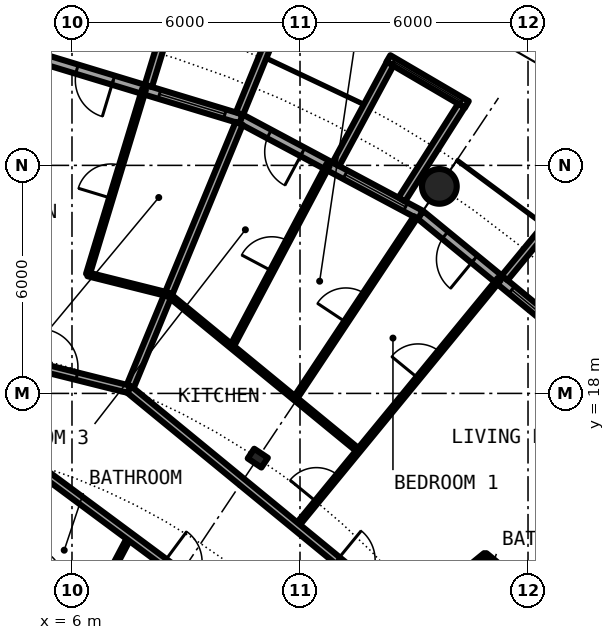
"""IFC4 building model, lengths in metres.
Left out: names, types, materials, properties, quantities, classifications, styles, units other than length and angle.
Written with IfcOpenShell. Run it as: python <this file> out.ifc"""

import sys

from ifc_helpers import new_model, si_unit, direction, frame, frame_2d, origin, origin_2d, place, context, subcontext, project, spatial, rectangle, circle, hollow_circle, i_section, extrude, element, fill, save


model = new_model("IFC4")
c1 = context("Model", 3, precision=1e-05, world=origin(), true_north=direction((0.0, 1.0)))
c2 = subcontext(c1, "Body", "Model", "MODEL_VIEW")
j1 = project(units=[si_unit("LENGTHUNIT", "METRE"), si_unit("PLANEANGLEUNIT", "RADIAN")], contexts=[c1])
p1 = place(None, origin())
s1 = spatial("IfcSite", under=j1, at=p1, CompositionType="ELEMENT")
p2 = place(p1, origin())
s2 = spatial("IfcBuilding", under=s1, at=p2, CompositionType="ELEMENT")
p3 = place(p2, frame((0.0, 0.0, 111.65)))
s3 = spatial("IfcBuildingStorey", under=s2, at=p3, CompositionType="ELEMENT", Elevation=111.65)
p4 = place(p3, frame((15.667, 23.448, 0.0), z_axis=(0.0, 0.0, 1.0), x_axis=(1.0, 0.0, 0.0)))
e1 = element("IfcColumn", 1, at=p4, inside=s3, PredefinedType="COLUMN", context=c2, shape_type="SweptSolid", body=[
    extrude(hollow_circle(Radius=0.457, WallThickness=0.04, at=origin_2d()), origin(), (0.0, 0.0, 1.0), 3.05),
])
p5 = place(p3, frame((10.889, 16.297, 0.0), z_axis=(0.0, 0.0, 1.0), x_axis=(0.55557023302, 0.831469612303, 0.0)))
e2 = element("IfcColumn", 2, at=p5, inside=s3, PredefinedType="COLUMN", context=c2, shape_type="SweptSolid", body=[
    extrude(i_section(OverallWidth=0.307, OverallDepth=0.432, WebThickness=0.021, FlangeThickness=0.04, FilletRadius=0.027, at=origin_2d()), origin(), (0.0, 0.0, 1.0), 3.05),
])
p6 = place(p3, frame((19.304, 19.304, 0.0), z_axis=(0.0, 0.0, 1.0), x_axis=(-0.773019449054, 0.634382322723, 0.0)))
e3 = element("IfcWall", 3, at=p6, inside=s3, PredefinedType="SOLIDWALL", context=c2, shape_type="SweptSolid", body=[
    extrude(rectangle(XDim=5.352, YDim=0.25, at=frame_2d((2.676, 0.0))), origin(), (0.0, 0.0, 1.0), 2.7),
])
p7 = place(p6, frame((0.441, 0.0, 0.3)))
e4 = element("IfcOpeningElement", 4, at=p7, cuts=e3, PredefinedType="OPENING", context=c2, shape_type="SweptSolid", body=[
    extrude(rectangle(XDim=1.8, YDim=2.1, at=frame_2d((0.9, 1.05))), frame((0.0, 0.135, 0.0), z_axis=(0.0, -1.0, 0.0), x_axis=(1.0, 0.0, 0.0)), (0.0, 0.0, 1.0), 0.27),
])
p8 = place(p6, frame((3.51, 0.0, 0.0)))
e5 = element("IfcOpeningElement", 5, at=p8, cuts=e3, PredefinedType="OPENING", context=c2, shape_type="SweptSolid", body=[
    extrude(rectangle(XDim=1.0, YDim=2.2, at=frame_2d((0.5, 1.1))), frame((0.0, 0.135, 0.0), z_axis=(0.0, -1.0, 0.0), x_axis=(1.0, 0.0, 0.0)), (0.0, 0.0, 1.0), 0.27),
])
p9 = place(p3, frame((17.384, 21.041, -0.03), z_axis=(0.0, 0.0, 1.0), x_axis=(0.63709551667, 0.770784861449, 0.0)))
e6 = element("IfcWall", 6, at=p9, inside=s3, PredefinedType="SOLIDWALL", context=c2, shape_type="SweptSolid", body=[
    extrude(rectangle(XDim=3.006, YDim=0.2, at=frame_2d((1.503, 0.0))), origin(), (0.0, 0.0, 1.0), 2.73),
])
p10 = place(p3, frame((15.167, 22.699, 0.0), z_axis=(0.0, 0.0, 1.0), x_axis=(-0.881915646801, 0.471407246368, 0.0)))
e7 = element("IfcWall", 7, at=p10, inside=s3, PredefinedType="SOLIDWALL", context=c2, shape_type="SweptSolid", body=[
    extrude(rectangle(XDim=5.352, YDim=0.25, at=frame_2d((2.676, 0.0))), origin(), (0.0, 0.0, 1.0), 2.7),
])
p11 = place(p10, frame((0.441, 0.0, 0.3)))
e8 = element("IfcOpeningElement", 8, at=p11, cuts=e7, PredefinedType="OPENING", context=c2, shape_type="SweptSolid", body=[
    extrude(rectangle(XDim=1.8, YDim=2.1, at=frame_2d((0.9, 1.05))), frame((0.0, 0.135, 0.0), z_axis=(0.0, -1.0, 0.0), x_axis=(1.0, 0.0, 0.0)), (0.0, 0.0, 1.0), 0.27),
])
p12 = place(p10, frame((3.51, 0.0, 0.0)))
e9 = element("IfcOpeningElement", 9, at=p12, cuts=e7, PredefinedType="OPENING", context=c2, shape_type="SweptSolid", body=[
    extrude(rectangle(XDim=1.0, YDim=2.2, at=frame_2d((0.5, 1.1))), frame((0.0, 0.135, 0.0), z_axis=(0.0, -1.0, 0.0), x_axis=(1.0, 0.0, 0.0)), (0.0, 0.0, 1.0), 0.27),
])
p13 = place(p3, frame((16.39, 25.603, -0.03), z_axis=(0.0, 0.0, 1.0), x_axis=(-0.862762477128, 0.505609442218, 0.0)))
e10 = element("IfcWall", 10, at=p13, inside=s3, PredefinedType="SOLIDWALL", context=c2, shape_type="SweptSolid", body=[
    extrude(rectangle(XDim=2.391, YDim=0.2, at=frame_2d((1.196, 0.0))), origin(), (0.0, 0.0, 1.0), 2.73),
])
p14 = place(p13, frame((0.156, 0.0, 0.33)))
e11 = element("IfcOpeningElement", 11, at=p14, cuts=e10, PredefinedType="OPENING", context=c2, shape_type="SweptSolid", body=[
    extrude(circle(Radius=1.04, at=frame_2d((1.04, 1.04))), frame((0.0, 0.11, 0.0), z_axis=(0.0, -1.0, 0.0), x_axis=(1.0, 0.0, 0.0)), (0.0, 0.0, 1.0), 0.22),
])
p15 = place(p3, frame((14.678, 23.102, -0.03), z_axis=(0.0, 0.0, 1.0), x_axis=(0.536001536573, 0.844217005746, 0.0)))
e12 = element("IfcWall", 12, at=p15, inside=s3, PredefinedType="SOLIDWALL", context=c2, shape_type="SweptSolid", body=[
    extrude(rectangle(XDim=2.929, YDim=0.2, at=frame_2d((1.465, 0.0))), origin(), (0.0, 0.0, 1.0), 2.73),
])
p16 = place(p3, frame((12.945, 24.029, -0.03), z_axis=(0.0, 0.0, 1.0), x_axis=(0.474424310775, 0.88029629861, 0.0)))
e13 = element("IfcWall", 13, at=p16, inside=s3, PredefinedType="SOLIDWALL", context=c2, shape_type="SweptSolid", body=[
    extrude(rectangle(XDim=3.006, YDim=0.2, at=frame_2d((1.503, 0.0))), origin(), (0.0, 0.0, 1.0), 2.73),
])
p17 = place(p3, frame((10.447, 25.222, 0.0), z_axis=(0.0, 0.0, 1.0), x_axis=(-0.956965678721, 0.290201119486, 0.0)))
e14 = element("IfcWall", 14, at=p17, inside=s3, PredefinedType="SOLIDWALL", context=c2, shape_type="SweptSolid", body=[
    extrude(rectangle(XDim=5.351, YDim=0.25, at=frame_2d((2.676, 0.0))), origin(), (0.0, 0.0, 1.0), 2.7),
])
p18 = place(p17, frame((0.441, 0.0, 0.3)))
e15 = element("IfcOpeningElement", 15, at=p18, cuts=e14, PredefinedType="OPENING", context=c2, shape_type="SweptSolid", body=[
    extrude(rectangle(XDim=1.8, YDim=2.1, at=frame_2d((0.9, 1.05))), frame((0.0, 0.135, 0.0), z_axis=(0.0, -1.0, 0.0), x_axis=(1.0, 0.0, 0.0)), (0.0, 0.0, 1.0), 0.27),
])
p19 = place(p17, frame((3.51, 0.0, 0.0)))
e16 = element("IfcOpeningElement", 16, at=p19, cuts=e14, PredefinedType="OPENING", context=c2, shape_type="SweptSolid", body=[
    extrude(rectangle(XDim=1.0, YDim=2.2, at=frame_2d((0.5, 1.1))), frame((0.0, 0.135, 0.0), z_axis=(0.0, -1.0, 0.0), x_axis=(1.0, 0.0, 0.0)), (0.0, 0.0, 1.0), 0.27),
])
p20 = place(p3, frame((10.409, 25.364, -0.03), z_axis=(0.0, 0.0, 1.0), x_axis=(0.379509886562, 0.925187681501, 0.0)))
e17 = element("IfcWall", 17, at=p20, inside=s3, PredefinedType="SOLIDWALL", context=c2, shape_type="SweptSolid", body=[
    extrude(rectangle(XDim=2.883, YDim=0.2, at=frame_2d((1.441, 0.0))), origin(), (0.0, 0.0, 1.0), 2.73),
])
p21 = place(p3, frame((8.009, 26.092, -0.03), z_axis=(0.0, 0.0, 1.0), x_axis=(0.293406695073, 0.955987715029, 0.0)))
e18 = element("IfcWall", 18, at=p21, inside=s3, PredefinedType="SOLIDWALL", context=c2, shape_type="SweptSolid", body=[
    extrude(rectangle(XDim=3.006, YDim=0.2, at=frame_2d((1.503, 0.0))), origin(), (0.0, 0.0, 1.0), 2.73),
])
p22 = place(p3, frame((6.318, 11.96, 0.0), z_axis=(0.0, 0.0, 1.0), x_axis=(0.467001992543, 0.884256263173, 0.0)))
e19 = element("IfcWall", 19, at=p22, inside=s3, PredefinedType="PARTITIONING", context=c2, shape_type="SweptSolid", body=[
    extrude(rectangle(XDim=2.572, YDim=0.1, at=frame_2d((1.286, 0.0))), origin(), (0.0, 0.0, 1.0), 2.7),
])
p23 = place(p3, frame((6.418, 21.133, 0.0), z_axis=(0.0, 0.0, 1.0), x_axis=(0.290651827018, 0.956828885147, 0.0)))
e20 = element("IfcWall", 20, at=p23, inside=s3, PredefinedType="PARTITIONING", context=c2, shape_type="SweptSolid", body=[
    extrude(rectangle(XDim=5.089, YDim=0.1, at=frame_2d((2.544, 0.0))), origin(), (0.0, 0.0, 1.0), 2.7),
])
p24 = place(p23, frame((2.094, 0.0, 0.0)))
e21 = element("IfcOpeningElement", 21, at=p24, cuts=e20, PredefinedType="OPENING", context=c2, shape_type="SweptSolid", body=[
    extrude(rectangle(XDim=0.9, YDim=2.3, at=frame_2d((0.45, 1.15))), frame((0.0, 0.06, 0.0), z_axis=(0.0, -1.0, 0.0), x_axis=(1.0, 0.0, 0.0)), (0.0, 0.0, 1.0), 0.12),
])
p25 = place(p3, frame((7.501, 18.108, 0.0), z_axis=(0.0, 0.0, 1.0), x_axis=(0.382490346157, 0.923959487801, 0.0)))
e22 = element("IfcWall", 22, at=p25, inside=s3, PredefinedType="PARTITIONING", context=c2, shape_type="SweptSolid", body=[
    extrude(rectangle(XDim=7.574, YDim=0.2, at=frame_2d((3.787, 0.0))), origin(), (0.0, 0.0, 1.0), 2.7),
])
p26 = place(p3, frame((10.204, 19.233, 0.0), z_axis=(0.0, 0.0, 1.0), x_axis=(0.468610030042, 0.883405139075, 0.0)))
e23 = element("IfcWall", 23, at=p26, inside=s3, PredefinedType="PARTITIONING", context=c2, shape_type="SweptSolid", body=[
    extrude(rectangle(XDim=5.403, YDim=0.1, at=frame_2d((2.702, 0.0))), origin(), (0.0, 0.0, 1.0), 2.7),
])
p27 = place(p26, frame((2.251, 0.0, 0.0)))
e24 = element("IfcOpeningElement", 24, at=p27, cuts=e23, PredefinedType="OPENING", context=c2, shape_type="SweptSolid", body=[
    extrude(rectangle(XDim=0.9, YDim=2.3, at=frame_2d((0.45, 1.15))), frame((0.0, 0.06, 0.0), z_axis=(0.0, -1.0, 0.0), x_axis=(1.0, 0.0, 0.0)), (0.0, 0.0, 1.0), 0.12),
])
p28 = place(p3, frame((11.87, 17.865, 0.0), z_axis=(0.0, 0.0, 1.0), x_axis=(0.553440102418, 0.832888980018, 0.0)))
e25 = element("IfcWall", 25, at=p28, inside=s3, PredefinedType="PARTITIONING", context=c2, shape_type="SweptSolid", body=[
    extrude(rectangle(XDim=5.726, YDim=0.1, at=frame_2d((2.863, 0.0))), origin(), (0.0, 0.0, 1.0), 2.7),
])
p29 = place(p28, frame((2.413, 0.0, 0.0)))
e26 = element("IfcOpeningElement", 26, at=p29, cuts=e25, PredefinedType="OPENING", context=c2, shape_type="SweptSolid", body=[
    extrude(rectangle(XDim=0.9, YDim=2.3, at=frame_2d((0.45, 1.15))), frame((0.0, 0.06, 0.0), z_axis=(0.0, -1.0, 0.0), x_axis=(1.0, 0.0, 0.0)), (0.0, 0.0, 1.0), 0.12),
])
p30 = place(p3, frame((11.9, 14.498, 0.0), z_axis=(0.0, 0.0, 1.0), x_axis=(0.634465454582, 0.772951218993, 0.0)))
e27 = element("IfcWall", 27, at=p30, inside=s3, PredefinedType="PARTITIONING", context=c2, shape_type="SweptSolid", body=[
    extrude(rectangle(XDim=8.42, YDim=0.1, at=frame_2d((4.21, 0.0))), origin(), (0.0, 0.0, 1.0), 2.7),
])
p31 = place(p30, frame((0.84, 0.0, 0.0)))
e28 = element("IfcOpeningElement", 28, at=p31, cuts=e27, PredefinedType="OPENING", context=c2, shape_type="SweptSolid", body=[
    extrude(rectangle(XDim=0.9, YDim=2.3, at=frame_2d((0.45, 1.15))), frame((0.0, 0.06, 0.0), z_axis=(0.0, -1.0, 0.0), x_axis=(1.0, 0.0, 0.0)), (0.0, 0.0, 1.0), 0.12),
])
p32 = place(p30, frame((5.051, 0.0, 0.0)))
e29 = element("IfcOpeningElement", 29, at=p32, cuts=e27, PredefinedType="OPENING", context=c2, shape_type="SweptSolid", body=[
    extrude(rectangle(XDim=0.9, YDim=2.3, at=frame_2d((0.45, 1.15))), frame((0.0, 0.06, 0.0), z_axis=(0.0, -1.0, 0.0), x_axis=(1.0, 0.0, 0.0)), (0.0, 0.0, 1.0), 0.12),
])
p33 = place(p3, frame((14.831, 12.092, 0.0), z_axis=(0.0, 0.0, 1.0), x_axis=(0.774979608522, 0.631986239072, 0.0)))
e30 = element("IfcWall", 30, at=p33, inside=s3, PredefinedType="PARTITIONING", context=c2, shape_type="SweptSolid", body=[
    extrude(rectangle(XDim=2.636, YDim=0.1, at=frame_2d((1.318, 0.0))), origin(), (0.0, 0.0, 1.0), 2.7),
])
p34 = place(p33, frame((0.868, 0.0, 0.0)))
e31 = element("IfcOpeningElement", 31, at=p34, cuts=e30, PredefinedType="OPENING", context=c2, shape_type="SweptSolid", body=[
    extrude(rectangle(XDim=0.9, YDim=2.3, at=frame_2d((0.45, 1.15))), frame((0.0, 0.06, 0.0), z_axis=(0.0, -1.0, 0.0), x_axis=(1.0, 0.0, 0.0)), (0.0, 0.0, 1.0), 0.12),
])
p35 = place(p3, frame((16.477, 11.009, 0.0), z_axis=(0.0, 0.0, 1.0), x_axis=(0.831406593008, 0.555664536482, 0.0)))
e32 = element("IfcWall", 32, at=p35, inside=s3, PredefinedType="PARTITIONING", context=c2, shape_type="SweptSolid", body=[
    extrude(rectangle(XDim=7.358, YDim=0.2, at=frame_2d((3.679, 0.0))), origin(), (0.0, 0.0, 1.0), 2.7),
])
p36 = place(p3, frame((4.122, 13.589, 0.0), z_axis=(0.0, 0.0, 1.0), x_axis=(0.803128348509, -0.595806055542, 0.0)))
e33 = element("IfcWall", 33, at=p36, inside=s3, PredefinedType="PARTITIONING", context=c2, shape_type="SweptSolid", body=[
    extrude(rectangle(XDim=2.734, YDim=0.1, at=frame_2d((1.367, 0.0))), origin(), (0.0, 0.0, 1.0), 2.7),
])
p37 = place(p36, frame((0.917, 0.0, 0.0)))
e34 = element("IfcOpeningElement", 34, at=p37, cuts=e33, PredefinedType="OPENING", context=c2, shape_type="SweptSolid", body=[
    extrude(rectangle(XDim=0.9, YDim=2.3, at=frame_2d((0.45, 1.15))), frame((0.0, 0.06, 0.0), z_axis=(0.0, -1.0, 0.0), x_axis=(1.0, 0.0, 0.0)), (0.0, 0.0, 1.0), 0.12),
])
p38 = place(p3, frame((4.906, 16.172, 0.0), z_axis=(0.0, 0.0, 1.0), x_axis=(0.803191461888, -0.595720971219, 0.0)))
e35 = element("IfcWall", 35, at=p38, inside=s3, PredefinedType="PARTITIONING", context=c2, shape_type="SweptSolid", body=[
    extrude(rectangle(XDim=9.76, YDim=0.2, at=frame_2d((4.88, 0.0))), origin(), (0.0, 0.0, 1.0), 2.7),
])
p39 = place(p38, frame((4.38, 0.0, 0.0)))
e36 = element("IfcOpeningElement", 36, at=p39, cuts=e35, PredefinedType="OPENING", context=c2, shape_type="SweptSolid", body=[
    extrude(rectangle(XDim=1.0, YDim=2.3, at=frame_2d((0.5, 1.15))), frame((0.0, 0.11, 0.0), z_axis=(0.0, -1.0, 0.0), x_axis=(1.0, 0.0, 0.0)), (0.0, 0.0, 1.0), 0.22),
])
p40 = place(p3, frame((7.5, 18.108, 0.0), z_axis=(0.0, 0.0, 1.0), x_axis=(0.773049018445, -0.634346289562, 0.0)))
e37 = element("IfcWall", 37, at=p40, inside=s3, PredefinedType="PARTITIONING", context=c2, shape_type="SweptSolid", body=[
    extrude(rectangle(XDim=11.219, YDim=0.2, at=frame_2d((5.61, 0.0))), origin(), (0.0, 0.0, 1.0), 2.39),
])
p41 = place(p40, frame((7.085, 0.0, 0.0)))
e38 = element("IfcOpeningElement", 38, at=p41, cuts=e37, PredefinedType="OPENING", context=c2, shape_type="SweptSolid", body=[
    extrude(rectangle(XDim=1.0, YDim=2.3, at=frame_2d((0.5, 1.15))), frame((0.0, 0.11, 0.0), z_axis=(0.0, -1.0, 0.0), x_axis=(1.0, 0.0, 0.0)), (0.0, 0.0, 1.0), 0.22),
])
p42 = place(p3, frame((3.936, 19.001, 0.0), z_axis=(0.0, 0.0, 1.0), x_axis=(0.970025155677, -0.243004521262, 0.0)))
e39 = element("IfcWall", 39, at=p42, inside=s3, PredefinedType="PARTITIONING", context=c2, shape_type="SweptSolid", body=[
    extrude(rectangle(XDim=3.675, YDim=0.2, at=frame_2d((1.837, 0.0))), origin(), (0.0, 0.0, 1.0), 2.39),
])
p43 = place(p42, frame((1.258, 0.0, 0.0)))
e40 = element("IfcOpeningElement", 40, at=p43, cuts=e39, PredefinedType="OPENING", context=c2, shape_type="SweptSolid", body=[
    extrude(rectangle(XDim=1.0, YDim=2.3, at=frame_2d((0.5, 1.15))), frame((0.0, 0.11, 0.0), z_axis=(0.0, -1.0, 0.0), x_axis=(1.0, 0.0, 0.0)), (0.0, 0.0, 1.0), 0.22),
])
p44 = place(p3, frame((8.534, 20.603, 0.0), z_axis=(0.0, 0.0, 1.0), x_axis=(0.773000340237, -0.634405606843, 0.0)))
e41 = element("IfcWall", 41, at=p44, inside=s3, PredefinedType="PARTITIONING", context=c2, shape_type="SweptSolid", body=[
    extrude(rectangle(XDim=6.474, YDim=0.1, at=frame_2d((3.237, 0.0))), origin(), (0.0, 0.0, 1.0), 2.7),
])
p45 = place(p3, frame((16.874, 13.758, 0.0), z_axis=(0.0, 0.0, 1.0), x_axis=(0.772948171844, -0.634469166818, 0.0)))
e42 = element("IfcWall", 42, at=p45, inside=s3, PredefinedType="PARTITIONING", context=c2, shape_type="SweptSolid", body=[
    extrude(rectangle(XDim=2.158, YDim=0.1, at=frame_2d((1.079, 0.0))), origin(), (0.0, 0.0, 1.0), 2.7),
])
p46 = place(p3, frame((6.418, 21.133, 0.0), z_axis=(0.0, 0.0, 1.0), x_axis=(0.97003047456, -0.242983288366, 0.0)))
e43 = element("IfcWall", 43, at=p46, inside=s3, PredefinedType="PARTITIONING", context=c2, shape_type="SweptSolid", body=[
    extrude(rectangle(XDim=2.181, YDim=0.1, at=frame_2d((1.091, 0.0))), origin(), (0.0, 0.0, 1.0), 2.7),
])
p47 = place(p7, origin())
e44 = element("IfcWindow", 44, at=p47, inside=s3, PartitioningType="SINGLE_PANEL", PredefinedType="WINDOW", context=c2, shape_type="SweptSolid", body=[
    extrude(rectangle(XDim=1.8, YDim=2.1, at=frame_2d((0.9, 1.05))), frame((0.0, 0.03, 0.0), z_axis=(0.0, -1.0, 0.0), x_axis=(1.0, 0.0, 0.0)), (0.0, 0.0, 1.0), 0.06),
])
fill(e4, e44)
p48 = place(p8, origin())
e45 = element("IfcDoor", 45, at=p48, inside=s3, OperationType="SINGLE_SWING_LEFT", PredefinedType="DOOR", context=c2, shape_type="SweptSolid", body=[
    extrude(rectangle(XDim=1.0, YDim=2.2, at=frame_2d((0.5, 1.1))), frame((0.0, 0.025, 0.0), z_axis=(0.0, -1.0, 0.0), x_axis=(1.0, 0.0, 0.0)), (0.0, 0.0, 1.0), 0.05),
])
fill(e5, e45)
p49 = place(p11, origin())
e46 = element("IfcWindow", 46, at=p49, inside=s3, PartitioningType="SINGLE_PANEL", PredefinedType="WINDOW", context=c2, shape_type="SweptSolid", body=[
    extrude(rectangle(XDim=1.8, YDim=2.1, at=frame_2d((0.9, 1.05))), frame((0.0, 0.03, 0.0), z_axis=(0.0, -1.0, 0.0), x_axis=(1.0, 0.0, 0.0)), (0.0, 0.0, 1.0), 0.06),
])
fill(e8, e46)
p50 = place(p14, origin())
e47 = element("IfcWindow", 47, at=p50, inside=s3, PartitioningType="SINGLE_PANEL", PredefinedType="WINDOW", context=c2, shape_type="SweptSolid", body=[
    extrude(circle(Radius=1.04, at=frame_2d((1.04, 1.04))), frame((0.0, 0.03, 0.0), z_axis=(0.0, -1.0, 0.0), x_axis=(1.0, 0.0, 0.0)), (0.0, 0.0, 1.0), 0.06),
])
fill(e11, e47)
p51 = place(p12, origin())
e48 = element("IfcDoor", 48, at=p51, inside=s3, OperationType="SINGLE_SWING_LEFT", PredefinedType="DOOR", context=c2, shape_type="SweptSolid", body=[
    extrude(rectangle(XDim=1.0, YDim=2.2, at=frame_2d((0.5, 1.1))), frame((0.0, 0.025, 0.0), z_axis=(0.0, -1.0, 0.0), x_axis=(1.0, 0.0, 0.0)), (0.0, 0.0, 1.0), 0.05),
])
fill(e9, e48)
p52 = place(p18, origin())
e49 = element("IfcWindow", 49, at=p52, inside=s3, PartitioningType="SINGLE_PANEL", PredefinedType="WINDOW", context=c2, shape_type="SweptSolid", body=[
    extrude(rectangle(XDim=1.8, YDim=2.1, at=frame_2d((0.9, 1.05))), frame((0.0, 0.03, 0.0), z_axis=(0.0, -1.0, 0.0), x_axis=(1.0, 0.0, 0.0)), (0.0, 0.0, 1.0), 0.06),
])
fill(e15, e49)
p53 = place(p19, origin())
e50 = element("IfcDoor", 50, at=p53, inside=s3, OperationType="SINGLE_SWING_LEFT", PredefinedType="DOOR", context=c2, shape_type="SweptSolid", body=[
    extrude(rectangle(XDim=1.0, YDim=2.2, at=frame_2d((0.5, 1.1))), frame((0.0, 0.025, 0.0), z_axis=(0.0, -1.0, 0.0), x_axis=(1.0, 0.0, 0.0)), (0.0, 0.0, 1.0), 0.05),
])
fill(e16, e50)
p54 = place(p41, origin())
e51 = element("IfcDoor", 51, at=p54, inside=s3, OperationType="SINGLE_SWING_RIGHT", PredefinedType="DOOR", context=c2, shape_type="SweptSolid", body=[
    extrude(rectangle(XDim=1.0, YDim=2.3, at=frame_2d((0.5, 1.15))), frame((0.0, 0.025, 0.0), z_axis=(0.0, -1.0, 0.0), x_axis=(1.0, 0.0, 0.0)), (0.0, 0.0, 1.0), 0.05),
])
fill(e38, e51)
p55 = place(p31, origin())
e52 = element("IfcDoor", 52, at=p55, inside=s3, OperationType="SINGLE_SWING_LEFT", PredefinedType="DOOR", context=c2, shape_type="SweptSolid", body=[
    extrude(rectangle(XDim=0.9, YDim=2.3, at=frame_2d((0.45, 1.15))), frame((0.0, 0.025, 0.0), z_axis=(0.0, -1.0, 0.0), x_axis=(1.0, 0.0, 0.0)), (0.0, 0.0, 1.0), 0.05),
])
fill(e28, e52)
p56 = place(p32, origin())
e53 = element("IfcDoor", 53, at=p56, inside=s3, OperationType="SINGLE_SWING_RIGHT", PredefinedType="DOOR", context=c2, shape_type="SweptSolid", body=[
    extrude(rectangle(XDim=0.9, YDim=2.3, at=frame_2d((0.45, 1.15))), frame((0.0, 0.025, 0.0), z_axis=(0.0, -1.0, 0.0), x_axis=(1.0, 0.0, 0.0)), (0.0, 0.0, 1.0), 0.05),
])
fill(e29, e53)
p57 = place(p29, origin())
e54 = element("IfcDoor", 54, at=p57, inside=s3, OperationType="SINGLE_SWING_LEFT", PredefinedType="DOOR", context=c2, shape_type="SweptSolid", body=[
    extrude(rectangle(XDim=0.9, YDim=2.3, at=frame_2d((0.45, 1.15))), frame((0.0, 0.025, 0.0), z_axis=(0.0, -1.0, 0.0), x_axis=(1.0, 0.0, 0.0)), (0.0, 0.0, 1.0), 0.05),
])
fill(e26, e54)
p58 = place(p27, origin())
e55 = element("IfcDoor", 55, at=p58, inside=s3, OperationType="SINGLE_SWING_LEFT", PredefinedType="DOOR", context=c2, shape_type="SweptSolid", body=[
    extrude(rectangle(XDim=0.9, YDim=2.3, at=frame_2d((0.45, 1.15))), frame((0.0, 0.025, 0.0), z_axis=(0.0, -1.0, 0.0), x_axis=(1.0, 0.0, 0.0)), (0.0, 0.0, 1.0), 0.05),
])
fill(e24, e55)
p59 = place(p43, origin())
e56 = element("IfcDoor", 56, at=p59, inside=s3, OperationType="SINGLE_SWING_LEFT", PredefinedType="DOOR", context=c2, shape_type="SweptSolid", body=[
    extrude(rectangle(XDim=1.0, YDim=2.3, at=frame_2d((0.5, 1.15))), frame((0.0, 0.025, 0.0), z_axis=(0.0, -1.0, 0.0), x_axis=(1.0, 0.0, 0.0)), (0.0, 0.0, 1.0), 0.05),
])
fill(e40, e56)
p60 = place(p24, origin())
e57 = element("IfcDoor", 57, at=p60, inside=s3, OperationType="SINGLE_SWING_LEFT", PredefinedType="DOOR", context=c2, shape_type="SweptSolid", body=[
    extrude(rectangle(XDim=0.9, YDim=2.3, at=frame_2d((0.45, 1.15))), frame((0.0, 0.025, 0.0), z_axis=(0.0, -1.0, 0.0), x_axis=(1.0, 0.0, 0.0)), (0.0, 0.0, 1.0), 0.05),
])
fill(e21, e57)
save(model, sys.argv[1])
